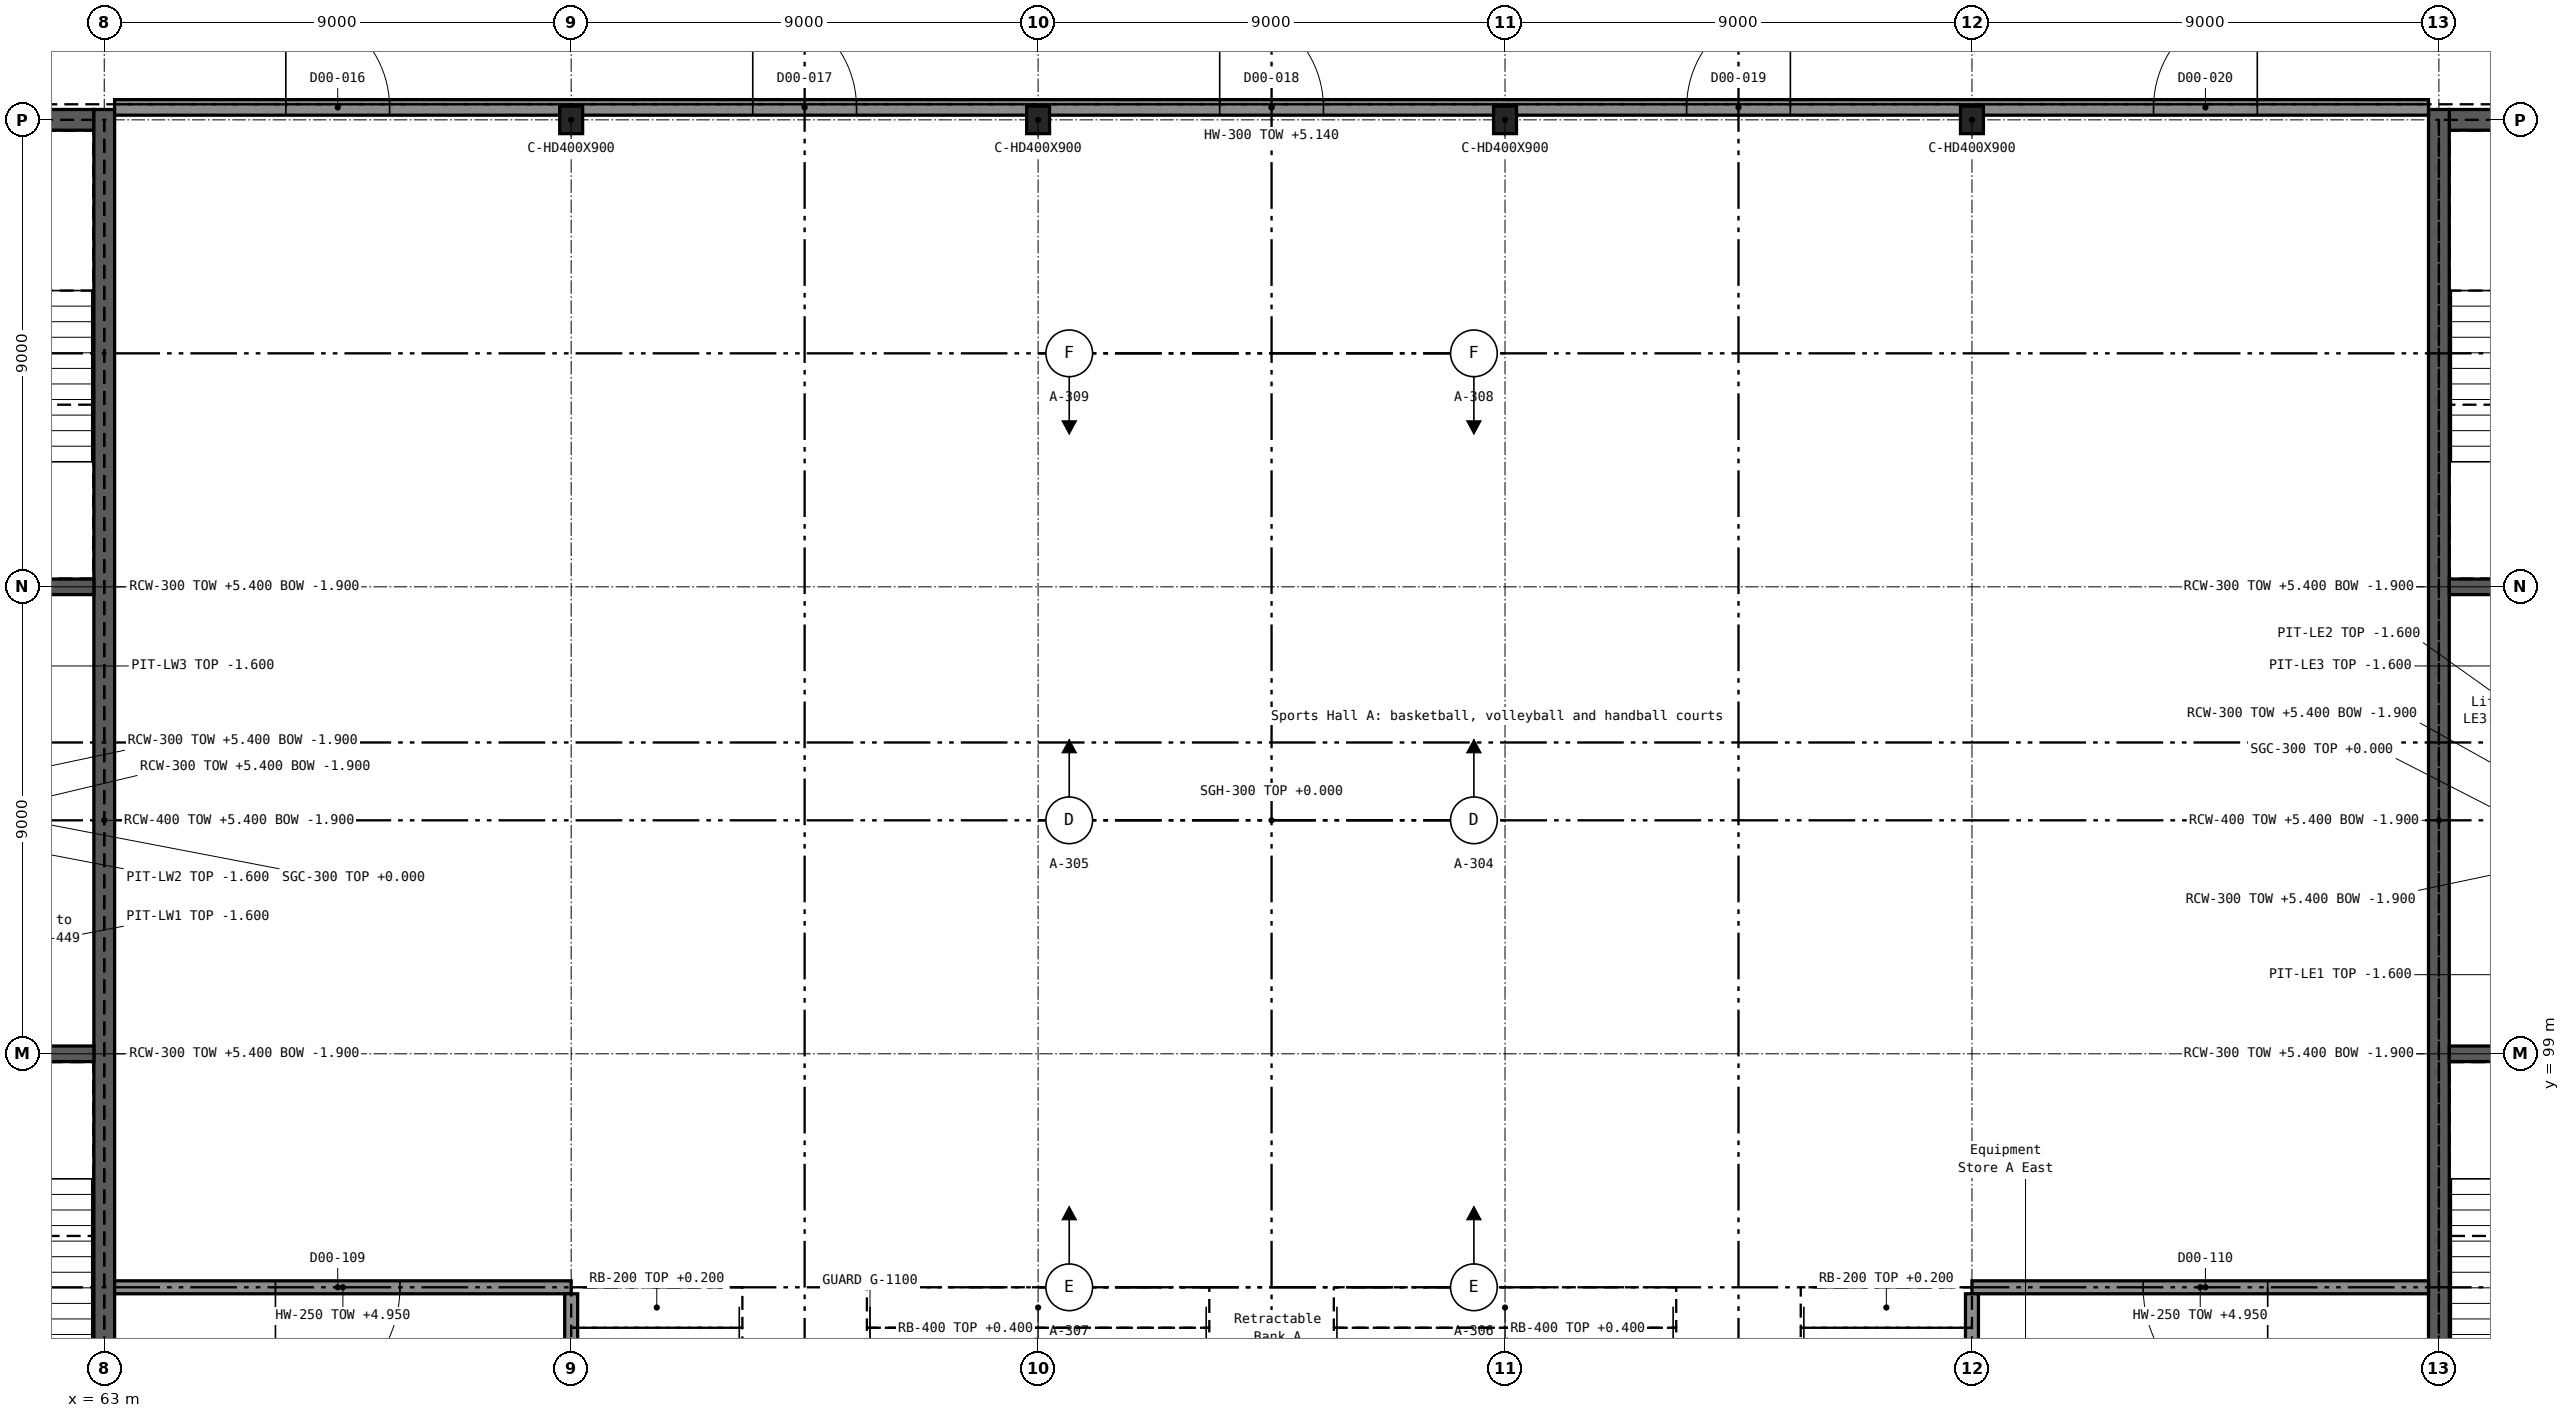
"""IFC4 building model, lengths in metres.
Left out: names, types, materials, properties, quantities, classifications, styles, units other than length and angle.
Written with IfcOpenShell. Run it as: python <this file> out.ifc"""

import sys

from ifc_helpers import new_model, si_unit, direction, frame, frame_2d, origin, origin_2d, place, context, subcontext, project, spatial, rectangle, i_section, extrude, element, fill, save


model = new_model("IFC4")
c1 = context("Model", 3, precision=1e-05, world=origin(), true_north=direction((0.0, 1.0)))
c2 = subcontext(c1, "Body", "Model", "MODEL_VIEW")
j1 = project(units=[si_unit("LENGTHUNIT", "METRE"), si_unit("PLANEANGLEUNIT", "RADIAN")], contexts=[c1])
p1 = place(None, origin())
s1 = spatial("IfcSite", under=j1, at=p1, CompositionType="ELEMENT")
p2 = place(p1, origin())
s2 = spatial("IfcBuilding", under=s1, at=p2, CompositionType="ELEMENT")
p3 = place(p2, origin())
s3 = spatial("IfcBuildingStorey", under=s2, at=p3, CompositionType="ELEMENT", Elevation=0.0)
for number, where, z_axis, x_axis in (
    (1, (72.0, 117.0, -0.3), (0.0, 0.0, 1.0), (1.0, 0.0, 0.0)),
    (2, (81.0, 117.0, -0.3), (0.0, 0.0, 1.0), (1.0, 0.0, 0.0)),
    (3, (90.0, 117.0, -0.3), (0.0, 0.0, 1.0), (1.0, 0.0, 0.0)),
    (4, (99.0, 117.0, -0.3), (0.0, 0.0, 1.0), (1.0, 0.0, 0.0)),
):
    element("IfcColumn", number, at=place(p3, frame(where, z_axis=z_axis, x_axis=x_axis)), inside=s3, PredefinedType="COLUMN", context=c2, shape_type="SweptSolid", body=[
        extrude(i_section(OverallWidth=0.442, OverallDepth=0.531, WebThickness=0.066, FlangeThickness=0.106, FilletRadius=0.015, at=origin_2d()), origin(), (0.0, 0.0, 1.0), 5.7),
    ])
p4 = place(p3, frame((54.2, 117.0, -1.9), z_axis=(0.0, 0.0, 1.0), x_axis=(1.0, 0.0, 0.0)))
e5 = element("IfcWall", 5, at=p4, inside=s3, PredefinedType="SHEAR", context=c2, shape_type="SweptSolid", body=[
    extrude(rectangle(XDim=8.6, YDim=0.4, at=frame_2d((4.3, 0.0))), origin(), (0.0, 0.0, 1.0), 7.3),
])
p5 = place(p4, frame((3.9, 0.0, 3.4)))
e6 = element("IfcOpeningElement", 6, at=p5, cuts=e5, PredefinedType="OPENING", context=c2, shape_type="SweptSolid", body=[
    extrude(rectangle(XDim=1.2, YDim=1.8, at=frame_2d((0.6, 0.9))), frame((0.0, 0.211, 0.0), z_axis=(0.0, -1.0, 0.0), x_axis=(1.0, 0.0, 0.0)), (0.0, 0.0, 1.0), 0.422),
])
p6 = place(p4, frame((0.7, 0.0, 1.9)))
e7 = element("IfcOpeningElement", 7, at=p6, cuts=e5, PredefinedType="OPENING", context=c2, shape_type="SweptSolid", body=[
    extrude(rectangle(XDim=1.2, YDim=2.1, at=frame_2d((0.6, 1.05))), frame((0.0, 0.211, 0.0), z_axis=(0.0, -1.0, 0.0), x_axis=(1.0, 0.0, 0.0)), (0.0, 0.0, 1.0), 0.422),
])
p7 = place(p3, frame((63.0, 89.8, -1.9), z_axis=(0.0, 0.0, 1.0), x_axis=(0.0, 1.0, 0.0)))
e8 = element("IfcWall", 8, at=p7, inside=s3, PredefinedType="SHEAR", context=c2, shape_type="SweptSolid", body=[
    extrude(rectangle(XDim=27.4, YDim=0.4, at=frame_2d((13.7, 0.0))), origin(), (0.0, 0.0, 1.0), 7.3),
])
for number, where, z_axis, x_axis in (
    (9, (54.2, 99.0, -1.9), (0.0, 0.0, 1.0), (1.0, 0.0, 0.0)),
    (10, (54.2, 108.0, -1.9), (0.0, 0.0, 1.0), (1.0, 0.0, 0.0)),
):
    element("IfcWall", number, at=place(p3, frame(where, z_axis=z_axis, x_axis=x_axis)), inside=s3, PredefinedType="SHEAR", context=c2, shape_type="SweptSolid", body=[
        extrude(rectangle(XDim=8.6, YDim=0.3, at=frame_2d((4.3, 0.0))), origin(), (0.0, 0.0, 1.0), 7.3),
    ])
p8 = place(p3, frame((108.2, 117.0, -1.9), z_axis=(0.0, 0.0, 1.0), x_axis=(1.0, 0.0, 0.0)))
e11 = element("IfcWall", 11, at=p8, inside=s3, PredefinedType="SHEAR", context=c2, shape_type="SweptSolid", body=[
    extrude(rectangle(XDim=8.6, YDim=0.4, at=frame_2d((4.3, 0.0))), origin(), (0.0, 0.0, 1.0), 7.3),
])
p9 = place(p8, frame((3.9, 0.0, 3.4)))
e12 = element("IfcOpeningElement", 12, at=p9, cuts=e11, PredefinedType="OPENING", context=c2, shape_type="SweptSolid", body=[
    extrude(rectangle(XDim=1.2, YDim=1.8, at=frame_2d((0.6, 0.9))), frame((0.0, 0.211, 0.0), z_axis=(0.0, -1.0, 0.0), x_axis=(1.0, 0.0, 0.0)), (0.0, 0.0, 1.0), 0.422),
])
p10 = place(p8, frame((6.7, 0.0, 1.9)))
e13 = element("IfcOpeningElement", 13, at=p10, cuts=e11, PredefinedType="OPENING", context=c2, shape_type="SweptSolid", body=[
    extrude(rectangle(XDim=1.2, YDim=2.1, at=frame_2d((0.6, 1.05))), frame((0.0, 0.211, 0.0), z_axis=(0.0, -1.0, 0.0), x_axis=(1.0, 0.0, 0.0)), (0.0, 0.0, 1.0), 0.422),
])
p11 = place(p3, frame((108.0, 89.8, -1.9), z_axis=(0.0, 0.0, 1.0), x_axis=(0.0, 1.0, 0.0)))
e14 = element("IfcWall", 14, at=p11, inside=s3, PredefinedType="SHEAR", context=c2, shape_type="SweptSolid", body=[
    extrude(rectangle(XDim=27.4, YDim=0.4, at=frame_2d((13.7, 0.0))), origin(), (0.0, 0.0, 1.0), 7.3),
])
for number, where, z_axis, x_axis in (
    (15, (108.2, 99.0, -1.9), (0.0, 0.0, 1.0), (1.0, 0.0, 0.0)),
    (16, (108.2, 108.0, -1.9), (0.0, 0.0, 1.0), (1.0, 0.0, 0.0)),
):
    element("IfcWall", number, at=place(p3, frame(where, z_axis=z_axis, x_axis=x_axis)), inside=s3, PredefinedType="SHEAR", context=c2, shape_type="SweptSolid", body=[
        extrude(rectangle(XDim=8.6, YDim=0.3, at=frame_2d((4.3, 0.0))), origin(), (0.0, 0.0, 1.0), 7.3),
    ])
p12 = place(p3, frame((107.8, 117.24, 0.0), z_axis=(0.0, 0.0, 1.0), x_axis=(-1.0, 0.0, 0.0)))
e17 = element("IfcWall", 17, at=p12, inside=s3, PredefinedType="SOLIDWALL", context=c2, shape_type="SweptSolid", body=[
    extrude(rectangle(XDim=44.6, YDim=0.3, at=frame_2d((22.3, 0.0))), origin(), (0.0, 0.0, 1.0), 5.14),
])
p13 = place(p12, frame((39.3, 0.0, 0.0)))
e18 = element("IfcOpeningElement", 18, at=p13, cuts=e17, PredefinedType="OPENING", context=c2, shape_type="SweptSolid", body=[
    extrude(rectangle(XDim=2.0, YDim=2.4, at=frame_2d((1.0, 1.2))), frame((0.0, 0.161, 0.0), z_axis=(0.0, -1.0, 0.0), x_axis=(1.0, 0.0, 0.0)), (0.0, 0.0, 1.0), 0.322),
])
p14 = place(p12, frame((30.3, 0.0, 0.0)))
e19 = element("IfcOpeningElement", 19, at=p14, cuts=e17, PredefinedType="OPENING", context=c2, shape_type="SweptSolid", body=[
    extrude(rectangle(XDim=2.0, YDim=2.4, at=frame_2d((1.0, 1.2))), frame((0.0, 0.161, 0.0), z_axis=(0.0, -1.0, 0.0), x_axis=(1.0, 0.0, 0.0)), (0.0, 0.0, 1.0), 0.322),
])
p15 = place(p12, frame((21.3, 0.0, 0.0)))
e20 = element("IfcOpeningElement", 20, at=p15, cuts=e17, PredefinedType="OPENING", context=c2, shape_type="SweptSolid", body=[
    extrude(rectangle(XDim=2.0, YDim=2.4, at=frame_2d((1.0, 1.2))), frame((0.0, 0.161, 0.0), z_axis=(0.0, -1.0, 0.0), x_axis=(1.0, 0.0, 0.0)), (0.0, 0.0, 1.0), 0.322),
])
p16 = place(p12, frame((12.3, 0.0, 0.0)))
e21 = element("IfcOpeningElement", 21, at=p16, cuts=e17, PredefinedType="OPENING", context=c2, shape_type="SweptSolid", body=[
    extrude(rectangle(XDim=2.0, YDim=2.4, at=frame_2d((1.0, 1.2))), frame((0.0, 0.161, 0.0), z_axis=(0.0, -1.0, 0.0), x_axis=(1.0, 0.0, 0.0)), (0.0, 0.0, 1.0), 0.322),
])
p17 = place(p12, frame((3.3, 0.0, 0.0)))
e22 = element("IfcOpeningElement", 22, at=p17, cuts=e17, PredefinedType="OPENING", context=c2, shape_type="SweptSolid", body=[
    extrude(rectangle(XDim=2.0, YDim=2.4, at=frame_2d((1.0, 1.2))), frame((0.0, 0.161, 0.0), z_axis=(0.0, -1.0, 0.0), x_axis=(1.0, 0.0, 0.0)), (0.0, 0.0, 1.0), 0.322),
])
p18 = place(p3, frame((63.2, 94.5, 0.0), z_axis=(0.0, 0.0, 1.0), x_axis=(1.0, 0.0, 0.0)))
e23 = element("IfcWall", 23, at=p18, inside=s3, PredefinedType="SOLIDWALL", context=c2, shape_type="SweptSolid", body=[
    extrude(rectangle(XDim=8.8, YDim=0.25, at=frame_2d((4.4, 0.0))), origin(), (0.0, 0.0, 1.0), 4.95),
])
p19 = place(p18, frame((3.1, 0.0, 0.0)))
e24 = element("IfcOpeningElement", 24, at=p19, cuts=e23, PredefinedType="OPENING", context=c2, shape_type="SweptSolid", body=[
    extrude(rectangle(XDim=2.4, YDim=3.0, at=frame_2d((1.2, 1.5))), frame((0.0, 0.136, 0.0), z_axis=(0.0, -1.0, 0.0), x_axis=(1.0, 0.0, 0.0)), (0.0, 0.0, 1.0), 0.272),
])
p20 = place(p3, frame((99.0, 94.5, 0.0), z_axis=(0.0, 0.0, 1.0), x_axis=(1.0, 0.0, 0.0)))
e25 = element("IfcWall", 25, at=p20, inside=s3, PredefinedType="SOLIDWALL", context=c2, shape_type="SweptSolid", body=[
    extrude(rectangle(XDim=8.8, YDim=0.25, at=frame_2d((4.4, 0.0))), origin(), (0.0, 0.0, 1.0), 4.95),
])
p21 = place(p20, frame((3.3, 0.0, 0.0)))
e26 = element("IfcOpeningElement", 26, at=p21, cuts=e25, PredefinedType="OPENING", context=c2, shape_type="SweptSolid", body=[
    extrude(rectangle(XDim=2.4, YDim=3.0, at=frame_2d((1.2, 1.5))), frame((0.0, 0.136, 0.0), z_axis=(0.0, -1.0, 0.0), x_axis=(1.0, 0.0, 0.0)), (0.0, 0.0, 1.0), 0.272),
])
for number, where, z_axis, x_axis in (
    (27, (72.0, 90.125, 0.0), (0.0, 0.0, 1.0), (0.0, 1.0, 0.0)),
    (28, (99.0, 90.125, 0.0), (0.0, 0.0, 1.0), (0.0, 1.0, 0.0)),
):
    element("IfcWall", number, at=place(p3, frame(where, z_axis=z_axis, x_axis=x_axis)), inside=s3, PredefinedType="SOLIDWALL", context=c2, shape_type="SweptSolid", body=[
        extrude(rectangle(XDim=4.25, YDim=0.25, at=frame_2d((2.125, 0.0))), origin(), (0.0, 0.0, 1.0), 5.25),
    ])
p22 = place(p13, frame((2.0, 0.0, 0.0), z_axis=(0.0, 0.0, 1.0), x_axis=(-1.0, 0.0, 0.0)))
e29 = element("IfcDoor", 29, at=p22, inside=s3, OperationType="DOUBLE_DOOR_DOUBLE_SWING", PredefinedType="DOOR", context=c2, shape_type="SweptSolid", body=[
    extrude(rectangle(XDim=2.0, YDim=2.4, at=frame_2d((1.0, 1.2))), frame((0.0, 0.025, 0.0), z_axis=(0.0, -1.0, 0.0), x_axis=(1.0, 0.0, 0.0)), (0.0, 0.0, 1.0), 0.05),
])
fill(e18, e29)
p23 = place(p14, frame((2.0, 0.0, 0.0), z_axis=(0.0, 0.0, 1.0), x_axis=(-1.0, 0.0, 0.0)))
e30 = element("IfcDoor", 30, at=p23, inside=s3, OperationType="DOUBLE_DOOR_DOUBLE_SWING", PredefinedType="DOOR", context=c2, shape_type="SweptSolid", body=[
    extrude(rectangle(XDim=2.0, YDim=2.4, at=frame_2d((1.0, 1.2))), frame((0.0, 0.025, 0.0), z_axis=(0.0, -1.0, 0.0), x_axis=(1.0, 0.0, 0.0)), (0.0, 0.0, 1.0), 0.05),
])
fill(e19, e30)
p24 = place(p15, frame((2.0, 0.0, 0.0), z_axis=(0.0, 0.0, 1.0), x_axis=(-1.0, 0.0, 0.0)))
e31 = element("IfcDoor", 31, at=p24, inside=s3, OperationType="DOUBLE_DOOR_DOUBLE_SWING", PredefinedType="DOOR", context=c2, shape_type="SweptSolid", body=[
    extrude(rectangle(XDim=2.0, YDim=2.4, at=frame_2d((1.0, 1.2))), frame((0.0, 0.025, 0.0), z_axis=(0.0, -1.0, 0.0), x_axis=(1.0, 0.0, 0.0)), (0.0, 0.0, 1.0), 0.05),
])
fill(e20, e31)
p25 = place(p16, frame((2.0, 0.0, 0.0), z_axis=(0.0, 0.0, 1.0), x_axis=(-1.0, 0.0, 0.0)))
e32 = element("IfcDoor", 32, at=p25, inside=s3, OperationType="DOUBLE_DOOR_DOUBLE_SWING", PredefinedType="DOOR", context=c2, shape_type="SweptSolid", body=[
    extrude(rectangle(XDim=2.0, YDim=2.4, at=frame_2d((1.0, 1.2))), frame((0.0, 0.025, 0.0), z_axis=(0.0, -1.0, 0.0), x_axis=(1.0, 0.0, 0.0)), (0.0, 0.0, 1.0), 0.05),
])
fill(e21, e32)
p26 = place(p17, frame((2.0, 0.0, 0.0), z_axis=(0.0, 0.0, 1.0), x_axis=(-1.0, 0.0, 0.0)))
e33 = element("IfcDoor", 33, at=p26, inside=s3, OperationType="DOUBLE_DOOR_DOUBLE_SWING", PredefinedType="DOOR", context=c2, shape_type="SweptSolid", body=[
    extrude(rectangle(XDim=2.0, YDim=2.4, at=frame_2d((1.0, 1.2))), frame((0.0, 0.025, 0.0), z_axis=(0.0, -1.0, 0.0), x_axis=(1.0, 0.0, 0.0)), (0.0, 0.0, 1.0), 0.05),
])
fill(e22, e33)
p27 = place(p19, frame((2.4, 0.0, 0.0), z_axis=(0.0, 0.0, 1.0), x_axis=(-1.0, 0.0, 0.0)))
e34 = element("IfcDoor", 34, at=p27, inside=s3, OperationType="DOUBLE_DOOR_SINGLE_SWING", PredefinedType="DOOR", context=c2, shape_type="SweptSolid", body=[
    extrude(rectangle(XDim=2.4, YDim=3.0, at=frame_2d((1.2, 1.5))), frame((0.0, 0.025, 0.0), z_axis=(0.0, -1.0, 0.0), x_axis=(1.0, 0.0, 0.0)), (0.0, 0.0, 1.0), 0.05),
])
fill(e24, e34)
p28 = place(p21, frame((2.4, 0.0, 0.0), z_axis=(0.0, 0.0, 1.0), x_axis=(-1.0, 0.0, 0.0)))
e35 = element("IfcDoor", 35, at=p28, inside=s3, OperationType="DOUBLE_DOOR_SINGLE_SWING", PredefinedType="DOOR", context=c2, shape_type="SweptSolid", body=[
    extrude(rectangle(XDim=2.4, YDim=3.0, at=frame_2d((1.2, 1.5))), frame((0.0, 0.025, 0.0), z_axis=(0.0, -1.0, 0.0), x_axis=(1.0, 0.0, 0.0)), (0.0, 0.0, 1.0), 0.05),
])
fill(e26, e35)
save(model, sys.argv[1])
